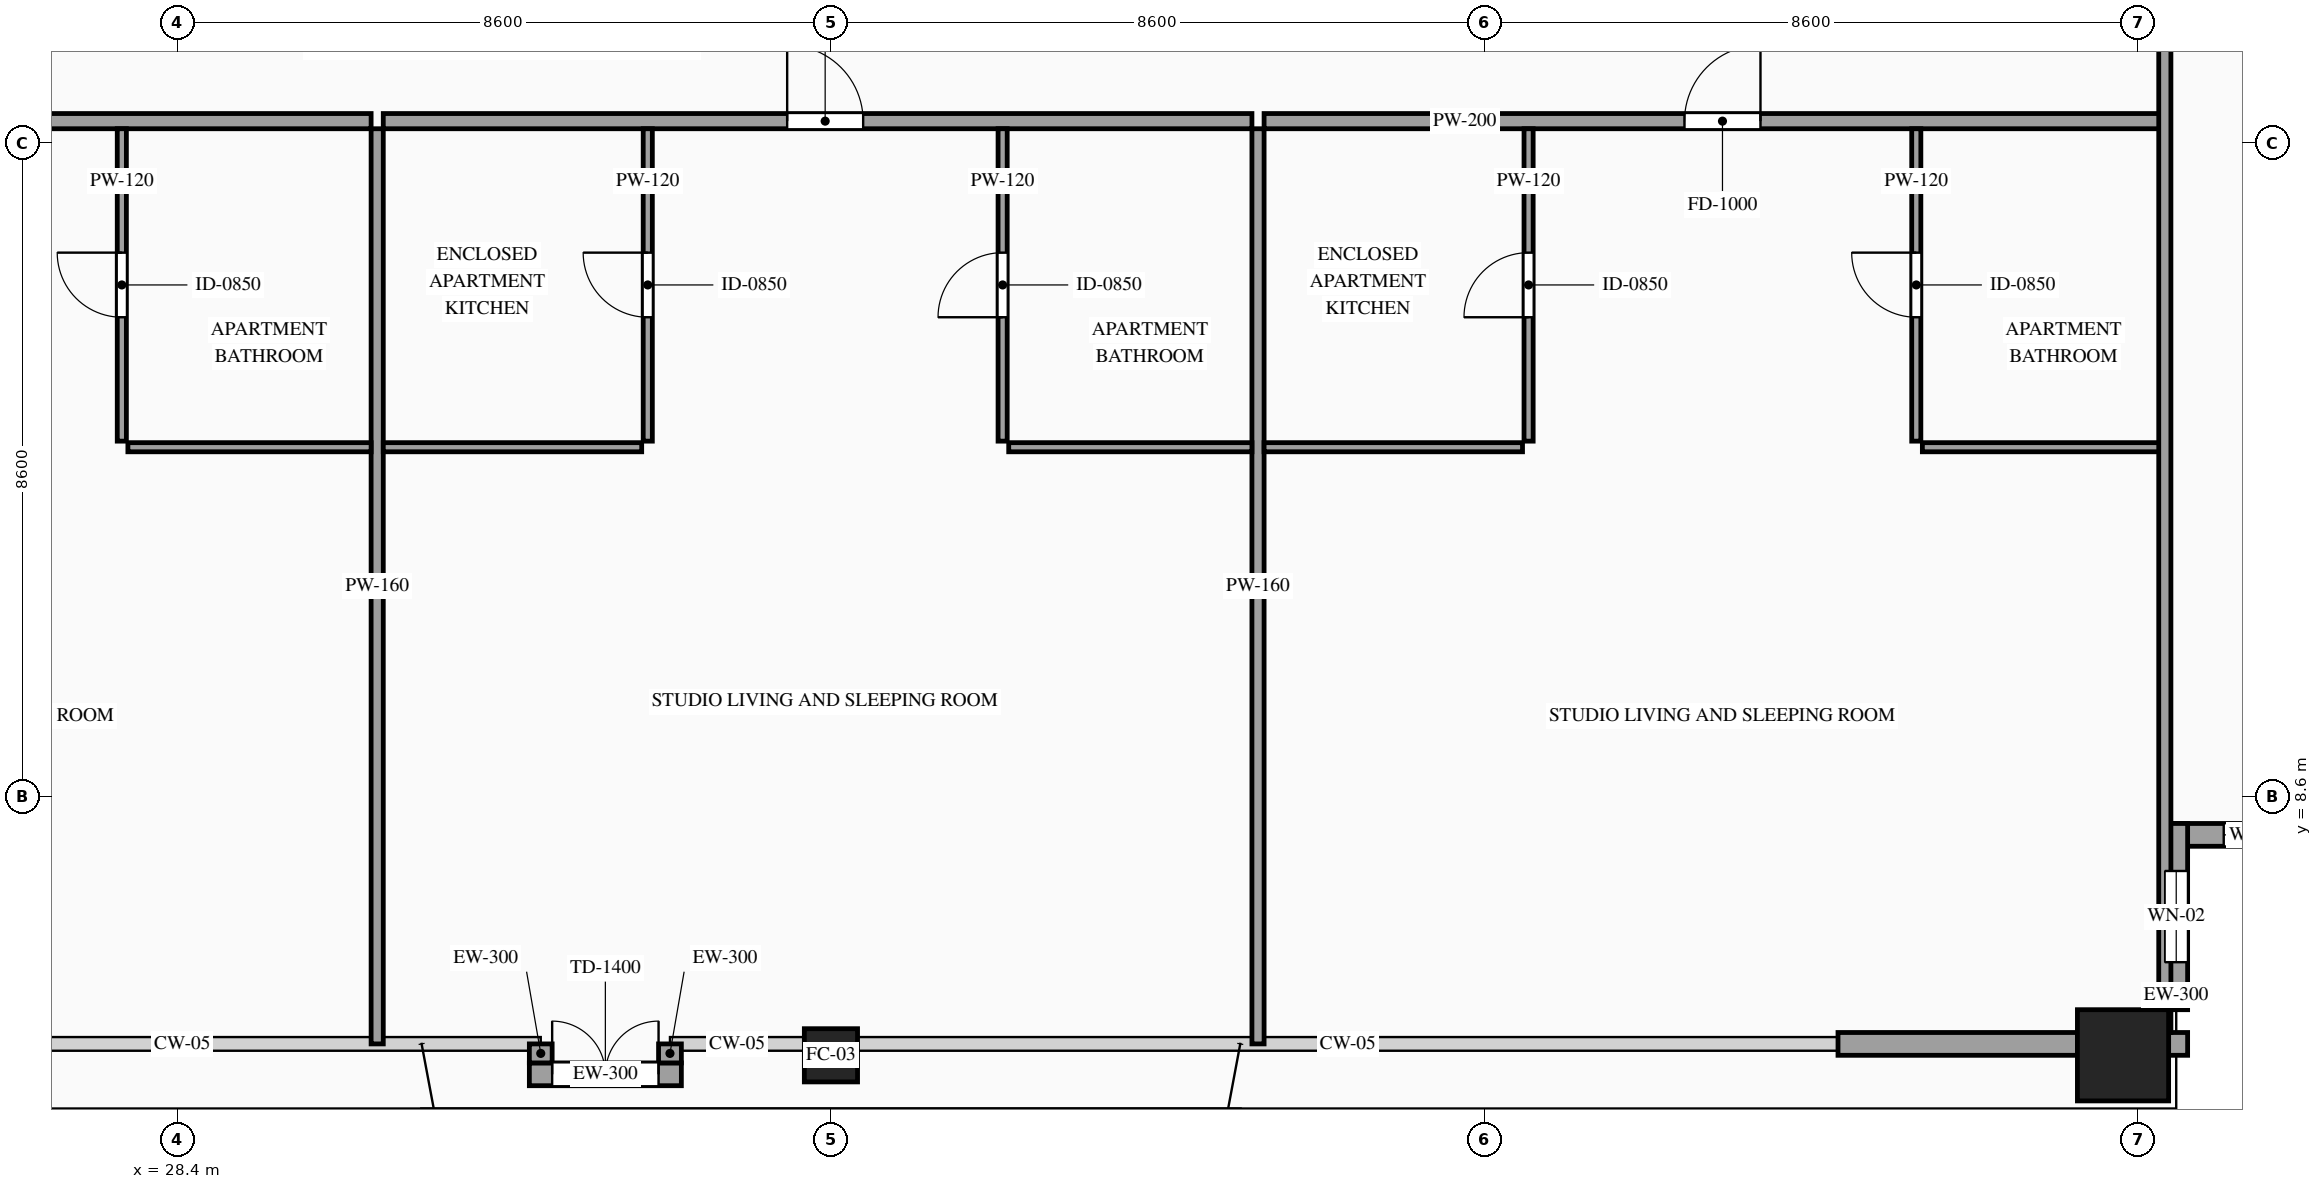
"""IFC4 building model, lengths in metres.
Left out: names, types, materials, properties, quantities, classifications, styles, units other than length and angle.
Written with IfcOpenShell. Run it as: python <this file> out.ifc"""

import sys

from ifc_helpers import new_model, si_unit, direction, frame, frame_2d, origin, origin_2d, place, context, subcontext, project, spatial, rectangle, hollow_rectangle, extrude, source, transform, mapped, element, fill, save


model = new_model("IFC4")
c1 = context("Model", 3, precision=1e-05, world=origin(), true_north=direction((0.0, 1.0)))
c2 = subcontext(c1, "Body", "Model", "MODEL_VIEW")
j1 = project(units=[si_unit("LENGTHUNIT", "METRE"), si_unit("PLANEANGLEUNIT", "RADIAN")], contexts=[c1])
p1 = place(None, origin())
s1 = spatial("IfcSite", under=j1, at=p1, CompositionType="ELEMENT")
p2 = place(p1, origin())
s2 = spatial("IfcBuilding", under=s1, at=p2, CompositionType="ELEMENT")
p3 = place(p2, frame((0.0, 0.0, 234.6)))
s3 = spatial("IfcBuildingStorey", under=s2, at=p3, CompositionType="ELEMENT", Elevation=234.6)
m1 = source(origin(), c2, "Body", "SweptSolid", [
    extrude(hollow_rectangle(XDim=0.7, YDim=0.7, WallThickness=0.032, at=origin_2d()), origin(), (0.0, 0.0, 1.0), 3.5),
])
p4 = place(p3, frame((37.0, 5.2, 0.0), z_axis=(0.0, 0.0, 1.0), x_axis=(1.0, 0.0, 0.0)))
e1 = element("IfcColumn", 1, at=p4, inside=s3, PredefinedType="COLUMN", context=c2, shape_type="MappedRepresentation", body=[
    mapped(m1, transform((0.0, 0.0, 0.0), scale=1.0)),
])
m2 = source(origin(), c2, "Body", "SweptSolid", [
    extrude(hollow_rectangle(XDim=1.2, YDim=1.2, WallThickness=0.055, at=origin_2d()), origin(), (0.0, 0.0, 1.0), 3.5),
])
p5 = place(p3, frame((54.0, 5.2, 0.0), z_axis=(0.0, 0.0, 1.0), x_axis=(1.0, 0.0, 0.0)))
e2 = element("IfcColumn", 2, at=p5, inside=s3, PredefinedType="COLUMN", context=c2, shape_type="MappedRepresentation", body=[
    mapped(m2, transform((0.0, 0.0, 0.0), scale=1.0)),
])
p6 = place(p3, frame((54.55, 8.1, 0.0), z_axis=(0.0, 0.0, 1.0), x_axis=(1.0, 0.0, 0.0)))
e3 = element("IfcWall", 3, at=p6, inside=s3, PredefinedType="SOLIDWALL", context=c2, shape_type="SweptSolid", body=[
    extrude(rectangle(XDim=2.45, YDim=0.3, at=frame_2d((1.225, 0.0))), origin(), (0.0, 0.0, 1.0), 3.28),
])
p7 = place(p6, frame((0.775, 0.0, 0.85)))
e4 = element("IfcOpeningElement", 4, at=p7, cuts=e3, PredefinedType="OPENING", context=c2, shape_type="SweptSolid", body=[
    extrude(rectangle(XDim=0.9, YDim=1.5, at=frame_2d((0.45, 0.75))), frame((0.0, 0.165, 0.0), z_axis=(0.0, -1.0, 0.0), x_axis=(1.0, 0.0, 0.0)), (0.0, 0.0, 1.0), 0.33),
])
p8 = place(p3, frame((54.7, 5.8, 0.0), z_axis=(0.0, 0.0, 1.0), x_axis=(0.0, 1.0, 0.0)))
e5 = element("IfcWall", 5, at=p8, inside=s3, PredefinedType="SOLIDWALL", context=c2, shape_type="SweptSolid", body=[
    extrude(rectangle(XDim=2.45, YDim=0.3, at=frame_2d((1.225, 0.0))), origin(), (0.0, 0.0, 1.0), 3.28),
])
p9 = place(p8, frame((0.625, 0.0, 0.85)))
e6 = element("IfcOpeningElement", 6, at=p9, cuts=e5, PredefinedType="OPENING", context=c2, shape_type="SweptSolid", body=[
    extrude(rectangle(XDim=1.2, YDim=2.1, at=frame_2d((0.6, 1.05))), frame((0.0, 0.165, 0.0), z_axis=(0.0, -1.0, 0.0), x_axis=(1.0, 0.0, 0.0)), (0.0, 0.0, 1.0), 0.33),
])
m3 = source(origin(), c2, "Body", "SweptSolid", [
    extrude(rectangle(XDim=0.25, YDim=0.3, at=frame_2d((0.125, 0.0))), origin(), (0.0, 0.0, 1.0), 3.28),
])
p10 = place(p3, frame((54.6, 5.35, 0.0), z_axis=(0.0, 0.0, 1.0), x_axis=(1.0, 0.0, 0.0)))
e7 = element("IfcWall", 7, at=p10, inside=s3, PredefinedType="SOLIDWALL", context=c2, shape_type="MappedRepresentation", body=[
    mapped(m3, transform((0.0, 0.0, 0.0), scale=1.0)),
])
m4 = source(origin(), c2, "Body", "SweptSolid", [
    extrude(rectangle(XDim=3.15, YDim=0.3, at=frame_2d((1.575, 0.0))), origin(), (0.0, 0.0, 1.0), 2.835),
])
p11 = place(p3, frame((50.25, 5.35, 0.0), z_axis=(0.0, 0.0, 1.0), x_axis=(1.0, 0.0, 0.0)))
e8 = element("IfcWall", 8, at=p11, inside=s3, PredefinedType="SOLIDWALL", context=c2, shape_type="MappedRepresentation", body=[
    mapped(m4, transform((0.0, 0.0, 0.0), scale=1.0)),
])
p12 = place(p3, frame((33.032, 4.95, 0.0), z_axis=(0.0, 0.0, 1.0), x_axis=(1.0, 0.0, 0.0)))
e9 = element("IfcWall", 9, at=p12, inside=s3, PredefinedType="SOLIDWALL", context=c2, shape_type="SweptSolid", body=[
    extrude(rectangle(XDim=2.0, YDim=0.3, at=frame_2d((1.0, 0.0))), origin(), (0.0, 0.0, 1.0), 2.835),
])
p13 = place(p12, frame((0.3, 0.0, 0.0)))
e10 = element("IfcOpeningElement", 10, at=p13, cuts=e9, PredefinedType="OPENING", context=c2, shape_type="SweptSolid", body=[
    extrude(rectangle(XDim=1.4, YDim=2.3, at=frame_2d((0.7, 1.15))), frame((0.0, 0.165, 0.0), z_axis=(0.0, -1.0, 0.0), x_axis=(1.0, 0.0, 0.0)), (0.0, 0.0, 1.0), 0.33),
])
for number, where, z_axis, x_axis in (
    (11, (33.182, 5.35, 0.0), (0.0, 0.0, 1.0), (0.0, -1.0, 0.0)),
    (12, (34.882, 5.1, 0.0), (0.0, 0.0, 1.0), (0.0, 1.0, 0.0)),
):
    element("IfcWall", number, at=place(p3, frame(where, z_axis=z_axis, x_axis=x_axis)), inside=s3, PredefinedType="SOLIDWALL", context=c2, shape_type="MappedRepresentation", body=[
        mapped(m3, transform((0.0, 0.0, 0.0), scale=1.0)),
    ])
p14 = place(p3, frame((19.44, 17.49, 0.0), z_axis=(0.0, 0.0, 1.0), x_axis=(1.0, 0.0, 0.0)))
e13 = element("IfcWall", 13, at=p14, inside=s3, PredefinedType="PARTITIONING", context=c2, shape_type="SweptSolid", body=[
    extrude(rectangle(XDim=11.51, YDim=0.2, at=frame_2d((5.755, 0.0))), origin(), (0.0, 0.0, 1.0), 3.28),
])
p15 = place(p14, frame((5.355, 0.0, 0.0)))
e14 = element("IfcOpeningElement", 14, at=p15, cuts=e13, PredefinedType="OPENING", context=c2, shape_type="SweptSolid", body=[
    extrude(rectangle(XDim=1.0, YDim=2.2, at=frame_2d((0.5, 1.1))), frame((0.0, 0.115, 0.0), z_axis=(0.0, -1.0, 0.0), x_axis=(1.0, 0.0, 0.0)), (0.0, 0.0, 1.0), 0.23),
])
m5 = source(origin(), c2, "Body", "SweptSolid", [
    extrude(rectangle(XDim=12.04, YDim=0.16, at=frame_2d((6.02, 0.0))), origin(), (0.0, 0.0, 1.0), 3.28),
])
p16 = place(p3, frame((31.03, 5.35, 0.0), z_axis=(0.0, 0.0, 1.0), x_axis=(0.0, 1.0, 0.0)))
e15 = element("IfcWall", 15, at=p16, inside=s3, PredefinedType="PARTITIONING", context=c2, shape_type="MappedRepresentation", body=[
    mapped(m5, transform((0.0, 0.0, 0.0), scale=1.0)),
])
m6 = source(origin(), c2, "Body", "SweptSolid", [
    extrude(rectangle(XDim=3.2, YDim=0.12, at=frame_2d((1.6, 0.0))), origin(), (0.0, 0.0, 1.0), 3.28),
])
p17 = place(p3, frame((27.75, 13.2, 0.0), z_axis=(0.0, 0.0, 1.0), x_axis=(1.0, 0.0, 0.0)))
e16 = element("IfcWall", 16, at=p17, inside=s3, PredefinedType="PARTITIONING", context=c2, shape_type="MappedRepresentation", body=[
    mapped(m6, transform((0.0, 0.0, 0.0), scale=1.0)),
])
p18 = place(p3, frame((27.67, 13.28, 0.0), z_axis=(0.0, 0.0, 1.0), x_axis=(0.0, 1.0, 0.0)))
e17 = element("IfcWall", 17, at=p18, inside=s3, PredefinedType="PARTITIONING", context=c2, shape_type="SweptSolid", body=[
    extrude(rectangle(XDim=4.11, YDim=0.12, at=frame_2d((2.055, 0.0))), origin(), (0.0, 0.0, 1.0), 3.28),
])
p19 = place(p18, frame((1.63, 0.0, 0.0)))
e18 = element("IfcOpeningElement", 18, at=p19, cuts=e17, PredefinedType="OPENING", context=c2, shape_type="SweptSolid", body=[
    extrude(rectangle(XDim=0.85, YDim=2.1, at=frame_2d((0.425, 1.05))), frame((0.0, 0.075, 0.0), z_axis=(0.0, -1.0, 0.0), x_axis=(1.0, 0.0, 0.0)), (0.0, 0.0, 1.0), 0.15),
])
p20 = place(p3, frame((31.11, 17.49, 0.0), z_axis=(0.0, 0.0, 1.0), x_axis=(1.0, 0.0, 0.0)))
e19 = element("IfcWall", 19, at=p20, inside=s3, PredefinedType="PARTITIONING", context=c2, shape_type="SweptSolid", body=[
    extrude(rectangle(XDim=11.429, YDim=0.2, at=frame_2d((5.714, 0.0))), origin(), (0.0, 0.0, 1.0), 3.28),
])
p21 = place(p20, frame((5.314, 0.0, 0.0)))
e20 = element("IfcOpeningElement", 20, at=p21, cuts=e19, PredefinedType="OPENING", context=c2, shape_type="SweptSolid", body=[
    extrude(rectangle(XDim=1.0, YDim=2.2, at=frame_2d((0.5, 1.1))), frame((0.0, 0.115, 0.0), z_axis=(0.0, -1.0, 0.0), x_axis=(1.0, 0.0, 0.0)), (0.0, 0.0, 1.0), 0.23),
])
p22 = place(p3, frame((42.619, 5.35, 0.0), z_axis=(0.0, 0.0, 1.0), x_axis=(0.0, 1.0, 0.0)))
e21 = element("IfcWall", 21, at=p22, inside=s3, PredefinedType="PARTITIONING", context=c2, shape_type="MappedRepresentation", body=[
    mapped(m5, transform((0.0, 0.0, 0.0), scale=1.0)),
])
m7 = source(origin(), c2, "Body", "SweptSolid", [
    extrude(rectangle(XDim=3.4, YDim=0.12, at=frame_2d((1.7, 0.0))), origin(), (0.0, 0.0, 1.0), 3.28),
])
p23 = place(p3, frame((31.11, 13.2, 0.0), z_axis=(0.0, 0.0, 1.0), x_axis=(1.0, 0.0, 0.0)))
e22 = element("IfcWall", 22, at=p23, inside=s3, PredefinedType="PARTITIONING", context=c2, shape_type="MappedRepresentation", body=[
    mapped(m7, transform((0.0, 0.0, 0.0), scale=1.0)),
])
p24 = place(p3, frame((34.59, 13.28, 0.0), z_axis=(0.0, 0.0, 1.0), x_axis=(0.0, 1.0, 0.0)))
e23 = element("IfcWall", 23, at=p24, inside=s3, PredefinedType="PARTITIONING", context=c2, shape_type="SweptSolid", body=[
    extrude(rectangle(XDim=4.11, YDim=0.12, at=frame_2d((2.055, 0.0))), origin(), (0.0, 0.0, 1.0), 3.28),
])
p25 = place(p24, frame((1.63, 0.0, 0.0)))
e24 = element("IfcOpeningElement", 24, at=p25, cuts=e23, PredefinedType="OPENING", context=c2, shape_type="SweptSolid", body=[
    extrude(rectangle(XDim=0.85, YDim=2.1, at=frame_2d((0.425, 1.05))), frame((0.0, 0.075, 0.0), z_axis=(0.0, -1.0, 0.0), x_axis=(1.0, 0.0, 0.0)), (0.0, 0.0, 1.0), 0.15),
])
p26 = place(p3, frame((39.339, 13.2, 0.0), z_axis=(0.0, 0.0, 1.0), x_axis=(1.0, 0.0, 0.0)))
e25 = element("IfcWall", 25, at=p26, inside=s3, PredefinedType="PARTITIONING", context=c2, shape_type="MappedRepresentation", body=[
    mapped(m6, transform((0.0, 0.0, 0.0), scale=1.0)),
])
p27 = place(p3, frame((39.259, 13.28, 0.0), z_axis=(0.0, 0.0, 1.0), x_axis=(0.0, 1.0, 0.0)))
e26 = element("IfcWall", 26, at=p27, inside=s3, PredefinedType="PARTITIONING", context=c2, shape_type="SweptSolid", body=[
    extrude(rectangle(XDim=4.11, YDim=0.12, at=frame_2d((2.055, 0.0))), origin(), (0.0, 0.0, 1.0), 3.28),
])
p28 = place(p27, frame((1.63, 0.0, 0.0)))
e27 = element("IfcOpeningElement", 27, at=p28, cuts=e26, PredefinedType="OPENING", context=c2, shape_type="SweptSolid", body=[
    extrude(rectangle(XDim=0.85, YDim=2.1, at=frame_2d((0.425, 1.05))), frame((0.0, 0.075, 0.0), z_axis=(0.0, -1.0, 0.0), x_axis=(1.0, 0.0, 0.0)), (0.0, 0.0, 1.0), 0.15),
])
p29 = place(p3, frame((42.699, 17.49, 0.0), z_axis=(0.0, 0.0, 1.0), x_axis=(1.0, 0.0, 0.0)))
e28 = element("IfcWall", 28, at=p29, inside=s3, PredefinedType="PARTITIONING", context=c2, shape_type="SweptSolid", body=[
    extrude(rectangle(XDim=11.861, YDim=0.2, at=frame_2d((5.931, 0.0))), origin(), (0.0, 0.0, 1.0), 3.28),
])
p30 = place(p29, frame((5.531, 0.0, 0.0)))
e29 = element("IfcOpeningElement", 29, at=p30, cuts=e28, PredefinedType="OPENING", context=c2, shape_type="SweptSolid", body=[
    extrude(rectangle(XDim=1.0, YDim=2.2, at=frame_2d((0.5, 1.1))), frame((0.0, 0.115, 0.0), z_axis=(0.0, -1.0, 0.0), x_axis=(1.0, 0.0, 0.0)), (0.0, 0.0, 1.0), 0.23),
])
m8 = source(origin(), c2, "Body", "SweptSolid", [
    extrude(rectangle(XDim=3.4, YDim=0.12, at=frame_2d((1.7, 0.0))), origin(), (0.0, 0.0, 1.0), 3.28),
])
p31 = place(p3, frame((42.699, 13.2, 0.0), z_axis=(0.0, 0.0, 1.0), x_axis=(1.0, 0.0, 0.0)))
e30 = element("IfcWall", 30, at=p31, inside=s3, PredefinedType="PARTITIONING", context=c2, shape_type="MappedRepresentation", body=[
    mapped(m8, transform((0.0, 0.0, 0.0), scale=1.0)),
])
p32 = place(p3, frame((46.179, 13.28, 0.0), z_axis=(0.0, 0.0, 1.0), x_axis=(0.0, 1.0, 0.0)))
e31 = element("IfcWall", 31, at=p32, inside=s3, PredefinedType="PARTITIONING", context=c2, shape_type="SweptSolid", body=[
    extrude(rectangle(XDim=4.11, YDim=0.12, at=frame_2d((2.055, 0.0))), origin(), (0.0, 0.0, 1.0), 3.28),
])
p33 = place(p32, frame((1.63, 0.0, 0.0)))
e32 = element("IfcOpeningElement", 32, at=p33, cuts=e31, PredefinedType="OPENING", context=c2, shape_type="SweptSolid", body=[
    extrude(rectangle(XDim=0.85, YDim=2.1, at=frame_2d((0.425, 1.05))), frame((0.0, 0.075, 0.0), z_axis=(0.0, -1.0, 0.0), x_axis=(1.0, 0.0, 0.0)), (0.0, 0.0, 1.0), 0.15),
])
p34 = place(p3, frame((51.36, 13.2, 0.0), z_axis=(0.0, 0.0, 1.0), x_axis=(1.0, 0.0, 0.0)))
e33 = element("IfcWall", 33, at=p34, inside=s3, PredefinedType="PARTITIONING", context=c2, shape_type="MappedRepresentation", body=[
    mapped(m6, transform((0.0, 0.0, 0.0), scale=1.0)),
])
p35 = place(p3, frame((51.28, 13.28, 0.0), z_axis=(0.0, 0.0, 1.0), x_axis=(0.0, 1.0, 0.0)))
e34 = element("IfcWall", 34, at=p35, inside=s3, PredefinedType="PARTITIONING", context=c2, shape_type="SweptSolid", body=[
    extrude(rectangle(XDim=4.11, YDim=0.12, at=frame_2d((2.055, 0.0))), origin(), (0.0, 0.0, 1.0), 3.28),
])
p36 = place(p35, frame((1.63, 0.0, 0.0)))
e35 = element("IfcOpeningElement", 35, at=p36, cuts=e34, PredefinedType="OPENING", context=c2, shape_type="SweptSolid", body=[
    extrude(rectangle(XDim=0.85, YDim=2.1, at=frame_2d((0.425, 1.05))), frame((0.0, 0.075, 0.0), z_axis=(0.0, -1.0, 0.0), x_axis=(1.0, 0.0, 0.0)), (0.0, 0.0, 1.0), 0.15),
])
m9 = source(origin(), c2, "Body", "SweptSolid", [
    extrude(rectangle(XDim=26.69, YDim=0.16, at=frame_2d((13.345, 0.0))), origin(), (0.0, 0.0, 1.0), 3.28),
])
p37 = place(p3, frame((54.55, 5.5, 0.0), z_axis=(0.0, 0.0, 1.0), x_axis=(0.0, 1.0, 0.0)))
e36 = element("IfcWall", 36, at=p37, inside=s3, PredefinedType="PARTITIONING", context=c2, shape_type="MappedRepresentation", body=[
    mapped(m9, transform((0.0, 0.0, 0.0), scale=1.0)),
])
m10 = source(origin(), c2, "Body", "SweptSolid", [
    extrude(rectangle(XDim=0.9, YDim=1.5, at=frame_2d((0.45, 0.75))), frame((0.0, 0.03, 0.0), z_axis=(0.0, -1.0, 0.0), x_axis=(1.0, 0.0, 0.0)), (0.0, 0.0, 1.0), 0.06),
])
p38 = place(p7, origin())
e37 = element("IfcWindow", 37, at=p38, inside=s3, PartitioningType="SINGLE_PANEL", PredefinedType="WINDOW", context=c2, shape_type="MappedRepresentation", body=[
    mapped(m10, transform((0.0, 0.0, 0.0), scale=1.0)),
])
fill(e4, e37)
m11 = source(origin(), c2, "Body", "SweptSolid", [
    extrude(rectangle(XDim=1.2, YDim=2.1, at=frame_2d((0.6, 1.05))), frame((0.0, 0.03, 0.0), z_axis=(0.0, -1.0, 0.0), x_axis=(1.0, 0.0, 0.0)), (0.0, 0.0, 1.0), 0.06),
])
p39 = place(p9, origin())
e38 = element("IfcWindow", 38, at=p39, inside=s3, PartitioningType="SINGLE_PANEL", PredefinedType="WINDOW", context=c2, shape_type="MappedRepresentation", body=[
    mapped(m11, transform((0.0, 0.0, 0.0), scale=1.0)),
])
fill(e6, e38)
m12 = source(origin(), c2, "Body", "SweptSolid", [
    extrude(rectangle(XDim=1.4, YDim=2.3, at=frame_2d((0.7, 1.15))), frame((0.0, 0.025, 0.0), z_axis=(0.0, -1.0, 0.0), x_axis=(1.0, 0.0, 0.0)), (0.0, 0.0, 1.0), 0.05),
])
p40 = place(p13, origin())
e39 = element("IfcDoor", 39, at=p40, inside=s3, OperationType="DOUBLE_DOOR_SINGLE_SWING", PredefinedType="DOOR", context=c2, shape_type="MappedRepresentation", body=[
    mapped(m12, transform((0.0, 0.0, 0.0), scale=1.0)),
])
fill(e10, e39)
m13 = source(origin(), c2, "Body", "SweptSolid", [
    extrude(rectangle(XDim=0.85, YDim=2.1, at=frame_2d((0.425, 1.05))), frame((0.0, 0.025, 0.0), z_axis=(0.0, -1.0, 0.0), x_axis=(1.0, 0.0, 0.0)), (0.0, 0.0, 1.0), 0.05),
])
p41 = place(p19, origin())
e40 = element("IfcDoor", 40, at=p41, inside=s3, OperationType="SINGLE_SWING_RIGHT", PredefinedType="DOOR", context=c2, shape_type="MappedRepresentation", body=[
    mapped(m13, transform((0.0, 0.0, 0.0), scale=1.0)),
])
fill(e18, e40)
m14 = source(origin(), c2, "Body", "SweptSolid", [
    extrude(rectangle(XDim=1.0, YDim=2.2, at=frame_2d((0.5, 1.1))), frame((0.0, 0.025, 0.0), z_axis=(0.0, -1.0, 0.0), x_axis=(1.0, 0.0, 0.0)), (0.0, 0.0, 1.0), 0.05),
])
p42 = place(p21, origin())
e41 = element("IfcDoor", 41, at=p42, inside=s3, OperationType="SINGLE_SWING_LEFT", PredefinedType="DOOR", context=c2, shape_type="MappedRepresentation", body=[
    mapped(m14, transform((0.0, 0.0, 0.0), scale=1.0)),
])
fill(e20, e41)
p43 = place(p25, origin())
e42 = element("IfcDoor", 42, at=p43, inside=s3, OperationType="SINGLE_SWING_RIGHT", PredefinedType="DOOR", context=c2, shape_type="MappedRepresentation", body=[
    mapped(m13, transform((0.0, 0.0, 0.0), scale=1.0)),
])
fill(e24, e42)
p44 = place(p28, origin())
e43 = element("IfcDoor", 43, at=p44, inside=s3, OperationType="SINGLE_SWING_LEFT", PredefinedType="DOOR", context=c2, shape_type="MappedRepresentation", body=[
    mapped(m13, transform((0.0, 0.0, 0.0), scale=1.0)),
])
fill(e27, e43)
p45 = place(p30, origin())
e44 = element("IfcDoor", 44, at=p45, inside=s3, OperationType="SINGLE_SWING_RIGHT", PredefinedType="DOOR", context=c2, shape_type="MappedRepresentation", body=[
    mapped(m14, transform((0.0, 0.0, 0.0), scale=1.0)),
])
fill(e29, e44)
p46 = place(p33, origin())
e45 = element("IfcDoor", 45, at=p46, inside=s3, OperationType="SINGLE_SWING_LEFT", PredefinedType="DOOR", context=c2, shape_type="MappedRepresentation", body=[
    mapped(m13, transform((0.0, 0.0, 0.0), scale=1.0)),
])
fill(e32, e45)
p47 = place(p36, origin())
e46 = element("IfcDoor", 46, at=p47, inside=s3, OperationType="SINGLE_SWING_RIGHT", PredefinedType="DOOR", context=c2, shape_type="MappedRepresentation", body=[
    mapped(m13, transform((0.0, 0.0, 0.0), scale=1.0)),
])
fill(e35, e46)
save(model, sys.argv[1])
